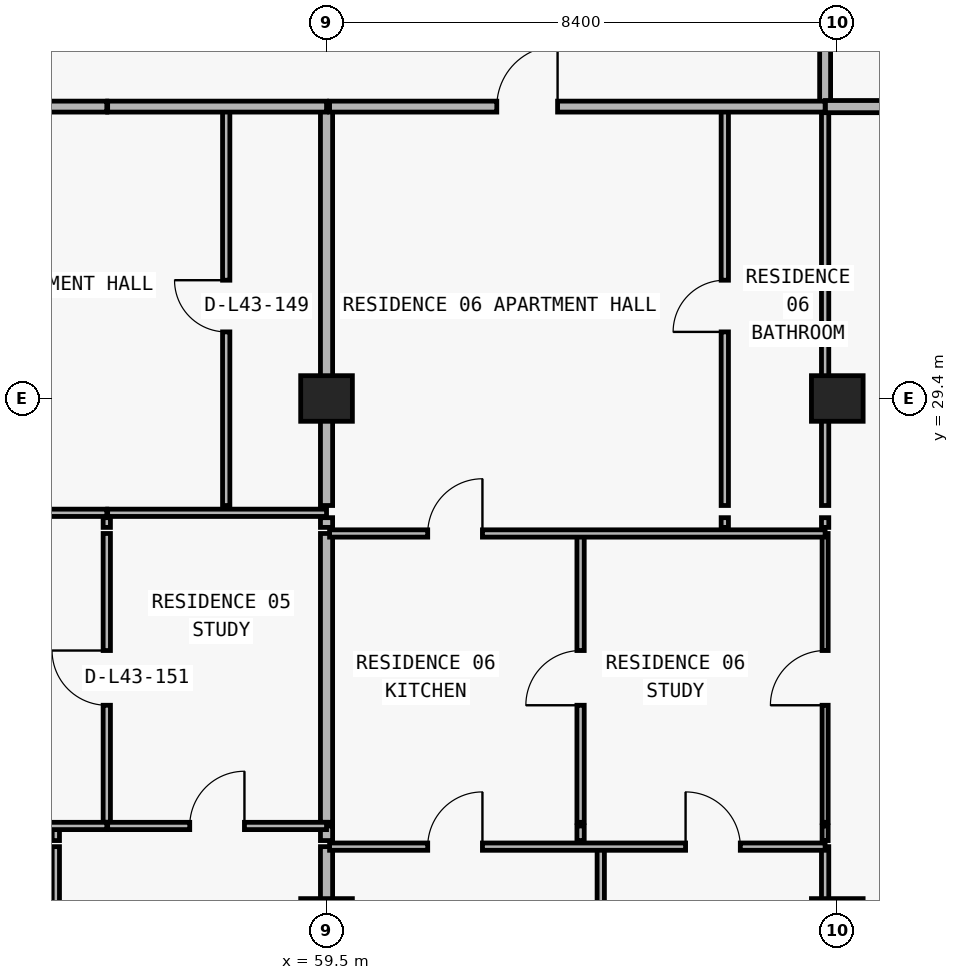
"""IFC4 building model, lengths in metres.
Left out: names, types, materials, properties, quantities, classifications, styles, units other than length and angle.
Written with IfcOpenShell. Run it as: python <this file> out.ifc"""

import sys

from ifc_helpers import new_model, si_unit, direction, frame, frame_2d, origin, origin_2d, place, context, subcontext, project, spatial, rectangle, extrude, element, fill, save


model = new_model("IFC4")
c1 = context("Model", 3, precision=1e-05, world=origin(), true_north=direction((0.0, 1.0)))
c2 = subcontext(c1, "Body", "Model", "MODEL_VIEW")
j1 = project(units=[si_unit("LENGTHUNIT", "METRE"), si_unit("PLANEANGLEUNIT", "RADIAN")], contexts=[c1])
p1 = place(None, origin())
s1 = spatial("IfcSite", under=j1, at=p1, CompositionType="ELEMENT")
p2 = place(p1, origin())
s2 = spatial("IfcBuilding", under=s1, at=p2, CompositionType="ELEMENT")
p3 = place(p2, frame((0.0, 0.0, 157.2)))
s3 = spatial("IfcBuildingStorey", under=s2, at=p3, CompositionType="ELEMENT", Elevation=157.2)
for number, where, z_axis, x_axis in (
    (1, (59.5, 20.8, 0.0), (0.0, 0.0, 1.0), (1.0, 0.0, 0.0)),
    (2, (67.9, 20.8, 0.0), (0.0, 0.0, 1.0), (1.0, 0.0, 0.0)),
    (3, (59.5, 29.4, 0.0), (0.0, 0.0, 1.0), (1.0, 0.0, 0.0)),
    (4, (67.9, 29.4, 0.0), (0.0, 0.0, 1.0), (1.0, 0.0, 0.0)),
):
    element("IfcColumn", number, at=place(p3, frame(where, z_axis=z_axis, x_axis=x_axis)), inside=s3, PredefinedType="COLUMN", context=c2, shape_type="SweptSolid", body=[
        extrude(rectangle(XDim=0.85, YDim=0.75, at=origin_2d()), origin(), (0.0, 0.0, 1.0), 3.05),
    ])
p4 = place(p3, frame((55.048, 11.24, 0.0), z_axis=(0.0, 0.0, 1.0), x_axis=(0.0, 1.0, 0.0)))
e5 = element("IfcWall", 5, at=p4, inside=s3, PredefinedType="PARTITIONING", context=c2, shape_type="SweptSolid", body=[
    extrude(rectangle(XDim=10.79, YDim=0.12, at=frame_2d((5.395, 0.0))), origin(), (0.0, 0.0, 1.0), 3.05),
])
p5 = place(p3, frame((55.048, 22.13, 0.0), z_axis=(0.0, 0.0, 1.0), x_axis=(0.0, 1.0, 0.0)))
e6 = element("IfcWall", 6, at=p5, inside=s3, PredefinedType="PARTITIONING", context=c2, shape_type="SweptSolid", body=[
    extrude(rectangle(XDim=0.24, YDim=0.12, at=frame_2d((0.12, 0.0))), origin(), (0.0, 0.0, 1.0), 3.05),
])
p6 = place(p3, frame((55.886, 22.43, 0.0), z_axis=(0.0, 0.0, 1.0), x_axis=(0.0, 1.0, 0.0)))
e7 = element("IfcWall", 7, at=p6, inside=s3, PredefinedType="PARTITIONING", context=c2, shape_type="SweptSolid", body=[
    extrude(rectangle(XDim=4.75, YDim=0.12, at=frame_2d((2.375, 0.0))), origin(), (0.0, 0.0, 1.0), 3.05),
])
p7 = place(p6, frame((1.925, 0.0, 0.0)))
e8 = element("IfcOpeningElement", 8, at=p7, cuts=e7, PredefinedType="OPENING", context=c2, shape_type="SweptSolid", body=[
    extrude(rectangle(XDim=0.9, YDim=2.15, at=frame_2d((0.45, 1.075))), frame((0.0, 0.07, 0.0), z_axis=(0.0, -1.0, 0.0), x_axis=(1.0, 0.0, 0.0)), (0.0, 0.0, 1.0), 0.14),
])
p8 = place(p3, frame((55.886, 27.28, 0.0), z_axis=(0.0, 0.0, 1.0), x_axis=(0.0, 1.0, 0.0)))
e9 = element("IfcWall", 9, at=p8, inside=s3, PredefinedType="PARTITIONING", context=c2, shape_type="SweptSolid", body=[
    extrude(rectangle(XDim=0.16, YDim=0.12, at=frame_2d((0.08, 0.0))), origin(), (0.0, 0.0, 1.0), 3.05),
])
p9 = place(p3, frame((57.85, 27.64, 0.0), z_axis=(0.0, 0.0, 1.0), x_axis=(0.0, 1.0, 0.0)))
e10 = element("IfcWall", 10, at=p9, inside=s3, PredefinedType="PARTITIONING", context=c2, shape_type="SweptSolid", body=[
    extrude(rectangle(XDim=6.56, YDim=0.12, at=frame_2d((3.28, 0.0))), origin(), (0.0, 0.0, 1.0), 3.05),
])
p10 = place(p9, frame((2.855, 0.0, 0.0)))
e11 = element("IfcOpeningElement", 11, at=p10, cuts=e10, PredefinedType="OPENING", context=c2, shape_type="SweptSolid", body=[
    extrude(rectangle(XDim=0.85, YDim=2.1, at=frame_2d((0.425, 1.05))), frame((0.0, 0.07, 0.0), z_axis=(0.0, -1.0, 0.0), x_axis=(1.0, 0.0, 0.0)), (0.0, 0.0, 1.0), 0.14),
])
p11 = place(p3, frame((59.5, 11.24, 0.0), z_axis=(0.0, 0.0, 1.0), x_axis=(0.0, 1.0, 0.0)))
e12 = element("IfcWall", 12, at=p11, inside=s3, PredefinedType="PARTITIONING", context=c2, shape_type="SweptSolid", body=[
    extrude(rectangle(XDim=10.79, YDim=0.2, at=frame_2d((5.395, 0.0))), origin(), (0.0, 0.0, 1.0), 2.263),
])
p12 = place(p3, frame((59.5, 22.13, 0.0), z_axis=(0.0, 0.0, 1.0), x_axis=(0.0, 1.0, 0.0)))
e13 = element("IfcWall", 13, at=p12, inside=s3, PredefinedType="PARTITIONING", context=c2, shape_type="SweptSolid", body=[
    extrude(rectangle(XDim=0.24, YDim=0.2, at=frame_2d((0.12, 0.0))), origin(), (0.0, 0.0, 1.0), 2.263),
])
p13 = place(p3, frame((59.5, 22.43, 0.0), z_axis=(0.0, 0.0, 1.0), x_axis=(0.0, 1.0, 0.0)))
e14 = element("IfcWall", 14, at=p13, inside=s3, PredefinedType="PARTITIONING", context=c2, shape_type="SweptSolid", body=[
    extrude(rectangle(XDim=4.75, YDim=0.2, at=frame_2d((2.375, 0.0))), origin(), (0.0, 0.0, 1.0), 2.263),
])
p14 = place(p3, frame((59.5, 27.28, 0.0), z_axis=(0.0, 0.0, 1.0), x_axis=(0.0, 1.0, 0.0)))
e15 = element("IfcWall", 15, at=p14, inside=s3, PredefinedType="PARTITIONING", context=c2, shape_type="SweptSolid", body=[
    extrude(rectangle(XDim=0.16, YDim=0.2, at=frame_2d((0.08, 0.0))), origin(), (0.0, 0.0, 1.0), 2.263),
])
p15 = place(p3, frame((59.5, 27.64, 0.0), z_axis=(0.0, 0.0, 1.0), x_axis=(0.0, 1.0, 0.0)))
e16 = element("IfcWall", 16, at=p15, inside=s3, PredefinedType="PARTITIONING", context=c2, shape_type="SweptSolid", body=[
    extrude(rectangle(XDim=6.56, YDim=0.2, at=frame_2d((3.28, 0.0))), origin(), (0.0, 0.0, 1.0), 2.263),
])
p16 = place(p3, frame((63.678, 22.13, 0.0), z_axis=(0.0, 0.0, 1.0), x_axis=(0.0, 1.0, 0.0)))
e17 = element("IfcWall", 17, at=p16, inside=s3, PredefinedType="PARTITIONING", context=c2, shape_type="SweptSolid", body=[
    extrude(rectangle(XDim=0.24, YDim=0.12, at=frame_2d((0.12, 0.0))), origin(), (0.0, 0.0, 1.0), 2.725),
])
p17 = place(p3, frame((63.678, 22.43, 0.0), z_axis=(0.0, 0.0, 1.0), x_axis=(0.0, 1.0, 0.0)))
e18 = element("IfcWall", 18, at=p17, inside=s3, PredefinedType="PARTITIONING", context=c2, shape_type="SweptSolid", body=[
    extrude(rectangle(XDim=4.75, YDim=0.12, at=frame_2d((2.375, 0.0))), origin(), (0.0, 0.0, 1.0), 2.725),
])
p18 = place(p17, frame((1.925, 0.0, 0.0)))
e19 = element("IfcOpeningElement", 19, at=p18, cuts=e18, PredefinedType="OPENING", context=c2, shape_type="SweptSolid", body=[
    extrude(rectangle(XDim=0.9, YDim=2.15, at=frame_2d((0.45, 1.075))), frame((0.0, 0.07, 0.0), z_axis=(0.0, -1.0, 0.0), x_axis=(1.0, 0.0, 0.0)), (0.0, 0.0, 1.0), 0.14),
])
p19 = place(p3, frame((64.01, 11.24, 0.0), z_axis=(0.0, 0.0, 1.0), x_axis=(0.0, 1.0, 0.0)))
e20 = element("IfcWall", 20, at=p19, inside=s3, PredefinedType="PARTITIONING", context=c2, shape_type="SweptSolid", body=[
    extrude(rectangle(XDim=10.79, YDim=0.12, at=frame_2d((5.395, 0.0))), origin(), (0.0, 0.0, 1.0), 3.05),
])
p20 = place(p3, frame((66.05, 27.28, 0.0), z_axis=(0.0, 0.0, 1.0), x_axis=(0.0, 1.0, 0.0)))
e21 = element("IfcWall", 21, at=p20, inside=s3, PredefinedType="PARTITIONING", context=c2, shape_type="SweptSolid", body=[
    extrude(rectangle(XDim=0.16, YDim=0.12, at=frame_2d((0.08, 0.0))), origin(), (0.0, 0.0, 1.0), 3.05),
])
p21 = place(p3, frame((66.05, 27.64, 0.0), z_axis=(0.0, 0.0, 1.0), x_axis=(0.0, 1.0, 0.0)))
e22 = element("IfcWall", 22, at=p21, inside=s3, PredefinedType="PARTITIONING", context=c2, shape_type="SweptSolid", body=[
    extrude(rectangle(XDim=6.56, YDim=0.12, at=frame_2d((3.28, 0.0))), origin(), (0.0, 0.0, 1.0), 3.05),
])
p22 = place(p21, frame((2.855, 0.0, 0.0)))
e23 = element("IfcOpeningElement", 23, at=p22, cuts=e22, PredefinedType="OPENING", context=c2, shape_type="SweptSolid", body=[
    extrude(rectangle(XDim=0.85, YDim=2.1, at=frame_2d((0.425, 1.05))), frame((0.0, 0.07, 0.0), z_axis=(0.0, -1.0, 0.0), x_axis=(1.0, 0.0, 0.0)), (0.0, 0.0, 1.0), 0.14),
])
p23 = place(p3, frame((67.7, 11.32, 0.0), z_axis=(0.0, 0.0, 1.0), x_axis=(0.0, 1.0, 0.0)))
e24 = element("IfcWall", 24, at=p23, inside=s3, PredefinedType="PARTITIONING", context=c2, shape_type="SweptSolid", body=[
    extrude(rectangle(XDim=10.71, YDim=0.12, at=frame_2d((5.355, 0.0))), origin(), (0.0, 0.0, 1.0), 2.263),
])
p24 = place(p3, frame((67.7, 22.13, 0.0), z_axis=(0.0, 0.0, 1.0), x_axis=(0.0, 1.0, 0.0)))
e25 = element("IfcWall", 25, at=p24, inside=s3, PredefinedType="MOVABLE", context=c2, shape_type="SweptSolid", body=[
    extrude(rectangle(XDim=0.24, YDim=0.1, at=frame_2d((0.12, 0.0))), origin(), (0.0, 0.0, 1.0), 2.263),
])
p25 = place(p3, frame((67.7, 22.43, 0.0), z_axis=(0.0, 0.0, 1.0), x_axis=(0.0, 1.0, 0.0)))
e26 = element("IfcWall", 26, at=p25, inside=s3, PredefinedType="MOVABLE", context=c2, shape_type="SweptSolid", body=[
    extrude(rectangle(XDim=4.75, YDim=0.1, at=frame_2d((2.375, 0.0))), origin(), (0.0, 0.0, 1.0), 2.263),
])
p26 = place(p25, frame((1.925, 0.0, 0.0)))
e27 = element("IfcOpeningElement", 27, at=p26, cuts=e26, PredefinedType="OPENING", context=c2, shape_type="SweptSolid", body=[
    extrude(rectangle(XDim=0.9, YDim=2.15, at=frame_2d((0.45, 1.075))), frame((0.0, 0.06, 0.0), z_axis=(0.0, -1.0, 0.0), x_axis=(1.0, 0.0, 0.0)), (0.0, 0.0, 1.0), 0.12),
])
p27 = place(p3, frame((67.7, 27.28, 0.0), z_axis=(0.0, 0.0, 1.0), x_axis=(0.0, 1.0, 0.0)))
e28 = element("IfcWall", 28, at=p27, inside=s3, PredefinedType="PARTITIONING", context=c2, shape_type="SweptSolid", body=[
    extrude(rectangle(XDim=0.16, YDim=0.12, at=frame_2d((0.08, 0.0))), origin(), (0.0, 0.0, 1.0), 2.263),
])
p28 = place(p3, frame((67.7, 27.64, 0.0), z_axis=(0.0, 0.0, 1.0), x_axis=(0.0, 1.0, 0.0)))
e29 = element("IfcWall", 29, at=p28, inside=s3, PredefinedType="PARTITIONING", context=c2, shape_type="SweptSolid", body=[
    extrude(rectangle(XDim=6.56, YDim=0.12, at=frame_2d((3.28, 0.0))), origin(), (0.0, 0.0, 1.0), 2.263),
])
p29 = place(p3, frame((67.7, 34.205, 0.0), z_axis=(0.0, 0.0, 1.0), x_axis=(0.0, 1.0, 0.0)))
e30 = element("IfcWall", 30, at=p29, inside=s3, PredefinedType="PARTITIONING", context=c2, shape_type="SweptSolid", body=[
    extrude(rectangle(XDim=2.745, YDim=0.18, at=frame_2d((1.373, 0.0))), origin(), (0.0, 0.0, 1.0), 2.263),
])
p30 = place(p3, frame((59.55, 22.03, 0.0), z_axis=(0.0, 0.0, 1.0), x_axis=(1.0, 0.0, 0.0)))
e31 = element("IfcWall", 31, at=p30, inside=s3, PredefinedType="PARTITIONING", context=c2, shape_type="SweptSolid", body=[
    extrude(rectangle(XDim=8.15, YDim=0.12, at=frame_2d((4.075, 0.0))), origin(), (0.0, 0.0, 1.0), 3.05),
])
p31 = place(p30, frame((1.614, 0.0, 0.0)))
e32 = element("IfcOpeningElement", 32, at=p31, cuts=e31, PredefinedType="OPENING", context=c2, shape_type="SweptSolid", body=[
    extrude(rectangle(XDim=0.9, YDim=2.15, at=frame_2d((0.45, 1.075))), frame((0.0, 0.07, 0.0), z_axis=(0.0, -1.0, 0.0), x_axis=(1.0, 0.0, 0.0)), (0.0, 0.0, 1.0), 0.14),
])
p32 = place(p30, frame((5.855, 0.0, 0.0)))
e33 = element("IfcOpeningElement", 33, at=p32, cuts=e31, PredefinedType="OPENING", context=c2, shape_type="SweptSolid", body=[
    extrude(rectangle(XDim=0.9, YDim=2.15, at=frame_2d((0.45, 1.075))), frame((0.0, 0.07, 0.0), z_axis=(0.0, -1.0, 0.0), x_axis=(1.0, 0.0, 0.0)), (0.0, 0.0, 1.0), 0.14),
])
p33 = place(p3, frame((51.32, 22.37, 0.0), z_axis=(0.0, 0.0, 1.0), x_axis=(1.0, 0.0, 0.0)))
e34 = element("IfcWall", 34, at=p33, inside=s3, PredefinedType="PARTITIONING", context=c2, shape_type="SweptSolid", body=[
    extrude(rectangle(XDim=4.566, YDim=0.12, at=frame_2d((2.283, 0.0))), origin(), (0.0, 0.0, 1.0), 3.05),
])
p34 = place(p33, frame((1.414, 0.0, 0.0)))
e35 = element("IfcOpeningElement", 35, at=p34, cuts=e34, PredefinedType="OPENING", context=c2, shape_type="SweptSolid", body=[
    extrude(rectangle(XDim=0.9, YDim=2.15, at=frame_2d((0.45, 1.075))), frame((0.0, 0.07, 0.0), z_axis=(0.0, -1.0, 0.0), x_axis=(1.0, 0.0, 0.0)), (0.0, 0.0, 1.0), 0.14),
])
p35 = place(p3, frame((55.9, 22.37, 0.0), z_axis=(0.0, 0.0, 1.0), x_axis=(1.0, 0.0, 0.0)))
e36 = element("IfcWall", 36, at=p35, inside=s3, PredefinedType="PARTITIONING", context=c2, shape_type="SweptSolid", body=[
    extrude(rectangle(XDim=3.6, YDim=0.12, at=frame_2d((1.8, 0.0))), origin(), (0.0, 0.0, 1.0), 3.05),
])
p36 = place(p35, frame((1.35, 0.0, 0.0)))
e37 = element("IfcOpeningElement", 37, at=p36, cuts=e36, PredefinedType="OPENING", context=c2, shape_type="SweptSolid", body=[
    extrude(rectangle(XDim=0.9, YDim=2.15, at=frame_2d((0.45, 1.075))), frame((0.0, 0.07, 0.0), z_axis=(0.0, -1.0, 0.0), x_axis=(1.0, 0.0, 0.0)), (0.0, 0.0, 1.0), 0.14),
])
p37 = place(p3, frame((59.55, 27.18, 0.0), z_axis=(0.0, 0.0, 1.0), x_axis=(1.0, 0.0, 0.0)))
e38 = element("IfcWall", 38, at=p37, inside=s3, PredefinedType="PARTITIONING", context=c2, shape_type="SweptSolid", body=[
    extrude(rectangle(XDim=8.15, YDim=0.12, at=frame_2d((4.075, 0.0))), origin(), (0.0, 0.0, 1.0), 3.05),
])
p38 = place(p37, frame((1.614, 0.0, 0.0)))
e39 = element("IfcOpeningElement", 39, at=p38, cuts=e38, PredefinedType="OPENING", context=c2, shape_type="SweptSolid", body=[
    extrude(rectangle(XDim=0.9, YDim=2.15, at=frame_2d((0.45, 1.075))), frame((0.0, 0.07, 0.0), z_axis=(0.0, -1.0, 0.0), x_axis=(1.0, 0.0, 0.0)), (0.0, 0.0, 1.0), 0.14),
])
p39 = place(p3, frame((51.32, 27.52, 0.0), z_axis=(0.0, 0.0, 1.0), x_axis=(1.0, 0.0, 0.0)))
e40 = element("IfcWall", 40, at=p39, inside=s3, PredefinedType="PARTITIONING", context=c2, shape_type="SweptSolid", body=[
    extrude(rectangle(XDim=4.566, YDim=0.12, at=frame_2d((2.283, 0.0))), origin(), (0.0, 0.0, 1.0), 3.05),
])
p40 = place(p39, frame((1.833, 0.0, 0.0)))
e41 = element("IfcOpeningElement", 41, at=p40, cuts=e40, PredefinedType="OPENING", context=c2, shape_type="SweptSolid", body=[
    extrude(rectangle(XDim=0.9, YDim=2.15, at=frame_2d((0.45, 1.075))), frame((0.0, 0.07, 0.0), z_axis=(0.0, -1.0, 0.0), x_axis=(1.0, 0.0, 0.0)), (0.0, 0.0, 1.0), 0.14),
])
p41 = place(p3, frame((55.9, 27.52, 0.0), z_axis=(0.0, 0.0, 1.0), x_axis=(1.0, 0.0, 0.0)))
e42 = element("IfcWall", 42, at=p41, inside=s3, PredefinedType="PARTITIONING", context=c2, shape_type="SweptSolid", body=[
    extrude(rectangle(XDim=3.6, YDim=0.12, at=frame_2d((1.8, 0.0))), origin(), (0.0, 0.0, 1.0), 3.05),
])
p42 = place(p3, frame((18.3, 34.2, 0.0), z_axis=(0.0, 0.0, 1.0), x_axis=(1.0, 0.0, 0.0)))
e43 = element("IfcWall", 43, at=p42, inside=s3, PredefinedType="PARTITIONING", context=c2, shape_type="SweptSolid", body=[
    extrude(rectangle(XDim=37.586, YDim=0.18, at=frame_2d((18.793, 0.0))), origin(), (0.0, 0.0, 1.0), 3.05),
])
p43 = place(p42, frame((2.875, 0.0, 0.0)))
e44 = element("IfcOpeningElement", 44, at=p43, cuts=e43, PredefinedType="OPENING", context=c2, shape_type="SweptSolid", body=[
    extrude(rectangle(XDim=1.0, YDim=2.2, at=frame_2d((0.5, 1.1))), frame((0.0, 0.1, 0.0), z_axis=(0.0, -1.0, 0.0), x_axis=(1.0, 0.0, 0.0)), (0.0, 0.0, 1.0), 0.2),
])
p44 = place(p42, frame((11.315, 0.0, 0.0)))
e45 = element("IfcOpeningElement", 45, at=p44, cuts=e43, PredefinedType="OPENING", context=c2, shape_type="SweptSolid", body=[
    extrude(rectangle(XDim=1.0, YDim=2.2, at=frame_2d((0.5, 1.1))), frame((0.0, 0.1, 0.0), z_axis=(0.0, -1.0, 0.0), x_axis=(1.0, 0.0, 0.0)), (0.0, 0.0, 1.0), 0.2),
])
p45 = place(p42, frame((27.275, 0.0, 0.0)))
e46 = element("IfcOpeningElement", 46, at=p45, cuts=e43, PredefinedType="OPENING", context=c2, shape_type="SweptSolid", body=[
    extrude(rectangle(XDim=1.0, YDim=2.2, at=frame_2d((0.5, 1.1))), frame((0.0, 0.1, 0.0), z_axis=(0.0, -1.0, 0.0), x_axis=(1.0, 0.0, 0.0)), (0.0, 0.0, 1.0), 0.2),
])
p46 = place(p42, frame((34.693, 0.0, 0.0)))
e47 = element("IfcOpeningElement", 47, at=p46, cuts=e43, PredefinedType="OPENING", context=c2, shape_type="SweptSolid", body=[
    extrude(rectangle(XDim=1.0, YDim=2.2, at=frame_2d((0.5, 1.1))), frame((0.0, 0.1, 0.0), z_axis=(0.0, -1.0, 0.0), x_axis=(1.0, 0.0, 0.0)), (0.0, 0.0, 1.0), 0.2),
])
p47 = place(p3, frame((55.9, 34.2, 0.0), z_axis=(0.0, 0.0, 1.0), x_axis=(1.0, 0.0, 0.0)))
e48 = element("IfcWall", 48, at=p47, inside=s3, PredefinedType="PARTITIONING", context=c2, shape_type="SweptSolid", body=[
    extrude(rectangle(XDim=3.6, YDim=0.18, at=frame_2d((1.8, 0.0))), origin(), (0.0, 0.0, 1.0), 3.05),
])
p48 = place(p3, frame((59.55, 34.2, 0.0), z_axis=(0.0, 0.0, 1.0), x_axis=(1.0, 0.0, 0.0)))
e49 = element("IfcWall", 49, at=p48, inside=s3, PredefinedType="PARTITIONING", context=c2, shape_type="SweptSolid", body=[
    extrude(rectangle(XDim=8.15, YDim=0.18, at=frame_2d((4.075, 0.0))), origin(), (0.0, 0.0, 1.0), 3.05),
])
p49 = place(p48, frame((2.75, 0.0, 0.0)))
e50 = element("IfcOpeningElement", 50, at=p49, cuts=e49, PredefinedType="OPENING", context=c2, shape_type="SweptSolid", body=[
    extrude(rectangle(XDim=1.0, YDim=2.2, at=frame_2d((0.5, 1.1))), frame((0.0, 0.1, 0.0), z_axis=(0.0, -1.0, 0.0), x_axis=(1.0, 0.0, 0.0)), (0.0, 0.0, 1.0), 0.2),
])
p50 = place(p3, frame((67.705, 34.2, 0.0), z_axis=(0.0, 0.0, 1.0), x_axis=(1.0, 0.0, 0.0)))
e51 = element("IfcWall", 51, at=p50, inside=s3, PredefinedType="PARTITIONING", context=c2, shape_type="SweptSolid", body=[
    extrude(rectangle(XDim=3.7, YDim=0.2, at=frame_2d((1.85, 0.0))), origin(), (0.0, 0.0, 1.0), 3.05),
])
p51 = place(p10, origin())
e52 = element("IfcDoor", 52, at=p51, inside=s3, OperationType="SINGLE_SWING_RIGHT", PredefinedType="DOOR", context=c2, shape_type="SweptSolid", body=[
    extrude(rectangle(XDim=0.85, YDim=2.1, at=frame_2d((0.425, 1.05))), frame((0.0, 0.025, 0.0), z_axis=(0.0, -1.0, 0.0), x_axis=(1.0, 0.0, 0.0)), (0.0, 0.0, 1.0), 0.05),
])
fill(e11, e52)
p52 = place(p7, origin())
e53 = element("IfcDoor", 53, at=p52, inside=s3, OperationType="SINGLE_SWING_RIGHT", PredefinedType="DOOR", context=c2, shape_type="SweptSolid", body=[
    extrude(rectangle(XDim=0.9, YDim=2.15, at=frame_2d((0.45, 1.075))), frame((0.0, 0.025, 0.0), z_axis=(0.0, -1.0, 0.0), x_axis=(1.0, 0.0, 0.0)), (0.0, 0.0, 1.0), 0.05),
])
fill(e8, e53)
p53 = place(p36, origin())
e54 = element("IfcDoor", 54, at=p53, inside=s3, OperationType="SINGLE_SWING_RIGHT", PredefinedType="DOOR", context=c2, shape_type="SweptSolid", body=[
    extrude(rectangle(XDim=0.9, YDim=2.15, at=frame_2d((0.45, 1.075))), frame((0.0, 0.025, 0.0), z_axis=(0.0, -1.0, 0.0), x_axis=(1.0, 0.0, 0.0)), (0.0, 0.0, 1.0), 0.05),
])
fill(e37, e54)
p54 = place(p49, origin())
e55 = element("IfcDoor", 55, at=p54, inside=s3, OperationType="SINGLE_SWING_RIGHT", PredefinedType="DOOR", context=c2, shape_type="SweptSolid", body=[
    extrude(rectangle(XDim=1.0, YDim=2.2, at=frame_2d((0.5, 1.1))), frame((0.0, 0.025, 0.0), z_axis=(0.0, -1.0, 0.0), x_axis=(1.0, 0.0, 0.0)), (0.0, 0.0, 1.0), 0.05),
])
fill(e50, e55)
p55 = place(p22, origin())
e56 = element("IfcDoor", 56, at=p55, inside=s3, OperationType="SINGLE_SWING_LEFT", PredefinedType="DOOR", context=c2, shape_type="SweptSolid", body=[
    extrude(rectangle(XDim=0.85, YDim=2.1, at=frame_2d((0.425, 1.05))), frame((0.0, 0.025, 0.0), z_axis=(0.0, -1.0, 0.0), x_axis=(1.0, 0.0, 0.0)), (0.0, 0.0, 1.0), 0.05),
])
fill(e23, e56)
p56 = place(p38, origin())
e57 = element("IfcDoor", 57, at=p56, inside=s3, OperationType="SINGLE_SWING_RIGHT", PredefinedType="DOOR", context=c2, shape_type="SweptSolid", body=[
    extrude(rectangle(XDim=0.9, YDim=2.15, at=frame_2d((0.45, 1.075))), frame((0.0, 0.025, 0.0), z_axis=(0.0, -1.0, 0.0), x_axis=(1.0, 0.0, 0.0)), (0.0, 0.0, 1.0), 0.05),
])
fill(e39, e57)
p57 = place(p18, origin())
e58 = element("IfcDoor", 58, at=p57, inside=s3, OperationType="SINGLE_SWING_LEFT", PredefinedType="DOOR", context=c2, shape_type="SweptSolid", body=[
    extrude(rectangle(XDim=0.9, YDim=2.15, at=frame_2d((0.45, 1.075))), frame((0.0, 0.025, 0.0), z_axis=(0.0, -1.0, 0.0), x_axis=(1.0, 0.0, 0.0)), (0.0, 0.0, 1.0), 0.05),
])
fill(e19, e58)
p58 = place(p31, origin())
e59 = element("IfcDoor", 59, at=p58, inside=s3, OperationType="SINGLE_SWING_RIGHT", PredefinedType="DOOR", context=c2, shape_type="SweptSolid", body=[
    extrude(rectangle(XDim=0.9, YDim=2.15, at=frame_2d((0.45, 1.075))), frame((0.0, 0.025, 0.0), z_axis=(0.0, -1.0, 0.0), x_axis=(1.0, 0.0, 0.0)), (0.0, 0.0, 1.0), 0.05),
])
fill(e32, e59)
p59 = place(p32, origin())
e60 = element("IfcDoor", 60, at=p59, inside=s3, OperationType="SINGLE_SWING_LEFT", PredefinedType="DOOR", context=c2, shape_type="SweptSolid", body=[
    extrude(rectangle(XDim=0.9, YDim=2.15, at=frame_2d((0.45, 1.075))), frame((0.0, 0.025, 0.0), z_axis=(0.0, -1.0, 0.0), x_axis=(1.0, 0.0, 0.0)), (0.0, 0.0, 1.0), 0.05),
])
fill(e33, e60)
p60 = place(p26, origin())
e61 = element("IfcDoor", 61, at=p60, inside=s3, OperationType="SINGLE_SWING_LEFT", PredefinedType="DOOR", context=c2, shape_type="SweptSolid", body=[
    extrude(rectangle(XDim=0.9, YDim=2.15, at=frame_2d((0.45, 1.075))), frame((0.0, 0.025, 0.0), z_axis=(0.0, -1.0, 0.0), x_axis=(1.0, 0.0, 0.0)), (0.0, 0.0, 1.0), 0.05),
])
fill(e27, e61)
save(model, sys.argv[1])
